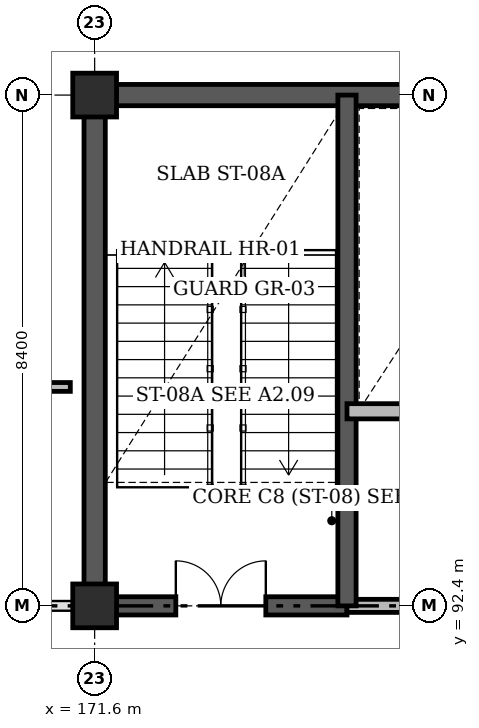
"""IFC4 building model, lengths in metres.
Left out: names, types, materials, properties, quantities, classifications, styles, units other than length and angle.
Written with IfcOpenShell. Run it as: python <this file> out.ifc"""

import sys

from ifc_helpers import new_model, si_unit, direction, frame, frame_2d, origin, origin_2d, place, context, subcontext, project, spatial, rectangle, extrude, element, fill, save


model = new_model("IFC4")
c1 = context("Model", 3, precision=1e-05, world=origin(), true_north=direction((0.0, 1.0)))
c2 = subcontext(c1, "Body", "Model", "MODEL_VIEW")
j1 = project(units=[si_unit("LENGTHUNIT", "METRE"), si_unit("PLANEANGLEUNIT", "RADIAN")], contexts=[c1])
p1 = place(None, origin())
s1 = spatial("IfcSite", under=j1, at=p1, CompositionType="ELEMENT")
p2 = place(p1, origin())
s2 = spatial("IfcBuilding", under=s1, at=p2, CompositionType="ELEMENT")
p3 = place(p2, origin())
s3 = spatial("IfcBuildingStorey", under=s2, at=p3, CompositionType="ELEMENT", Elevation=0.0)
p4 = place(p3, frame((171.425, 100.8, 0.0), z_axis=(0.0, 0.0, 1.0), x_axis=(1.0, 0.0, 0.0)))
e1 = element("IfcWall", 1, at=p4, inside=s3, PredefinedType="SHEAR", context=c2, shape_type="SweptSolid", body=[
    extrude(rectangle(XDim=8.15, YDim=0.35, at=frame_2d((4.075, 0.0))), origin(), (0.0, 0.0, 1.0), 4.48),
])
p5 = place(p3, frame((171.6, 92.4, 0.0), z_axis=(0.0, 0.0, 1.0), x_axis=(0.0, 1.0, 0.0)))
e2 = element("IfcWall", 2, at=p5, inside=s3, PredefinedType="SHEAR", context=c2, shape_type="SweptSolid", body=[
    extrude(rectangle(XDim=8.4, YDim=0.35, at=frame_2d((4.2, 0.0))), origin(), (0.0, 0.0, 1.0), 4.48),
])
for number, where, z_axis, x_axis in (
    (3, (171.6, 92.4, 0.0), (0.0, 0.0, 1.0), (1.0, 0.0, 0.0)),
    (4, (171.6, 100.8, 0.0), (0.0, 0.0, 1.0), (1.0, 0.0, 0.0)),
):
    element("IfcColumn", number, at=place(p3, frame(where, z_axis=z_axis, x_axis=x_axis)), inside=s3, PredefinedType="COLUMN", context=c2, shape_type="SweptSolid", body=[
        extrude(rectangle(XDim=0.72, YDim=0.72, at=origin_2d()), origin(), (0.0, 0.0, 1.0), 4.8),
    ])
p6 = place(p3, frame((171.6, 92.4, 0.0), z_axis=(0.0, 0.0, 1.0), x_axis=(1.0, 0.0, 0.0)))
e5 = element("IfcWall", 5, at=p6, inside=s3, PredefinedType="SHEAR", context=c2, shape_type="SweptSolid", body=[
    extrude(rectangle(XDim=4.15, YDim=0.3, at=frame_2d((2.075, 0.0))), origin(), (0.0, 0.0, 1.0), 4.8),
])
p7 = place(p6, frame((1.335, 0.0, 0.0)))
e6 = element("IfcOpeningElement", 6, at=p7, cuts=e5, PredefinedType="OPENING", context=c2, shape_type="SweptSolid", body=[
    extrude(rectangle(XDim=1.48, YDim=2.2, at=frame_2d((0.74, 1.1))), frame((0.0, 0.16, 0.0), z_axis=(0.0, -1.0, 0.0), x_axis=(1.0, 0.0, 0.0)), (0.0, 0.0, 1.0), 0.32),
])
p8 = place(p3, frame((175.75, 92.4, 0.0), z_axis=(0.0, 0.0, 1.0), x_axis=(1.0, 0.0, 0.0)))
e7 = element("IfcWall", 7, at=p8, inside=s3, PredefinedType="STANDARD", context=c2, shape_type="SweptSolid", body=[
    extrude(rectangle(XDim=3.29, YDim=0.215, at=frame_2d((1.645, 0.0))), origin(), (0.0, 0.0, 1.0), 3.63),
])
p9 = place(p8, frame((0.925, 0.0, 0.0)))
e8 = element("IfcOpeningElement", 8, at=p9, cuts=e7, PredefinedType="OPENING", context=c2, shape_type="SweptSolid", body=[
    extrude(rectangle(XDim=1.44, YDim=2.2, at=frame_2d((0.72, 1.1))), frame((0.0, 0.118, 0.0), z_axis=(0.0, -1.0, 0.0), x_axis=(1.0, 0.0, 0.0)), (0.0, 0.0, 1.0), 0.235),
])
p10 = place(p3, frame((175.75, 92.4, 0.0), z_axis=(0.0, 0.0, 1.0), x_axis=(0.0, 1.0, 0.0)))
e9 = element("IfcWall", 9, at=p10, inside=s3, PredefinedType="SHEAR", context=c2, shape_type="SweptSolid", body=[
    extrude(rectangle(XDim=8.4, YDim=0.3, at=frame_2d((4.2, 0.0))), origin(), (0.0, 0.0, 1.0), 4.8),
])
p11 = place(p3, frame((175.75, 95.6, 0.0), z_axis=(0.0, 0.0, 1.0), x_axis=(1.0, 0.0, 0.0)))
e10 = element("IfcWall", 10, at=p11, inside=s3, PredefinedType="STANDARD", context=c2, shape_type="SweptSolid", body=[
    extrude(rectangle(XDim=3.5, YDim=0.25, at=frame_2d((1.75, 0.0))), origin(), (0.0, 0.0, 1.0), 4.46),
])
p12 = place(p11, frame((1.2, 0.0, 0.0)))
e11 = element("IfcOpeningElement", 11, at=p12, cuts=e10, PredefinedType="OPENING", context=c2, shape_type="SweptSolid", body=[
    extrude(rectangle(XDim=1.1, YDim=2.2, at=frame_2d((0.55, 1.1))), frame((0.0, 0.135, 0.0), z_axis=(0.0, -1.0, 0.0), x_axis=(1.0, 0.0, 0.0)), (0.0, 0.0, 1.0), 0.27),
])
p13 = place(p3, frame((148.0, 96.0, 0.0), z_axis=(0.0, 0.0, 1.0), x_axis=(1.0, 0.0, 0.0)))
e12 = element("IfcWall", 12, at=p13, inside=s3, PredefinedType="PARTITIONING", context=c2, shape_type="SweptSolid", body=[
    extrude(rectangle(XDim=23.2, YDim=0.145, at=frame_2d((11.6, 0.0))), origin(), (0.0, 0.0, 1.0), 4.46),
])
p14 = place(p7, origin())
e13 = element("IfcDoor", 13, at=p14, inside=s3, OperationType="DOUBLE_DOOR_SINGLE_SWING", PredefinedType="DOOR", context=c2, shape_type="SweptSolid", body=[
    extrude(rectangle(XDim=1.48, YDim=2.2, at=frame_2d((0.74, 1.1))), frame((0.0, 0.025, 0.0), z_axis=(0.0, -1.0, 0.0), x_axis=(1.0, 0.0, 0.0)), (0.0, 0.0, 1.0), 0.05),
])
fill(e6, e13)
save(model, sys.argv[1])
